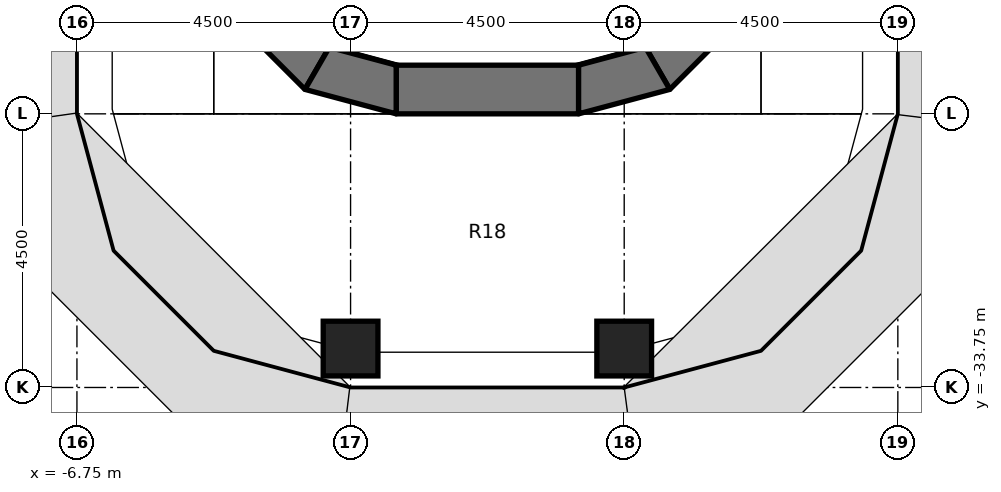
"""IFC4 building model, lengths in metres.
Left out: names, types, materials, properties, quantities, classifications, styles, units other than length and angle.
Written with IfcOpenShell. Run it as: python <this file> out.ifc"""

import sys

from ifc_helpers import new_model, si_unit, direction, frame, frame_2d, origin, origin_2d, place, context, subcontext, project, spatial, polyline, rectangle, outline, extrude, element, save


model = new_model("IFC4")
c1 = context("Model", 3, precision=1e-05, world=origin(), true_north=direction((0.0, 1.0)))
c2 = subcontext(c1, "Body", "Model", "MODEL_VIEW")
j1 = project(units=[si_unit("LENGTHUNIT", "METRE"), si_unit("PLANEANGLEUNIT", "RADIAN")], contexts=[c1])
p1 = place(None, origin())
s1 = spatial("IfcSite", under=j1, at=p1, CompositionType="ELEMENT")
p2 = place(p1, origin())
s2 = spatial("IfcBuilding", under=s1, at=p2, CompositionType="ELEMENT")
p3 = place(p2, frame((0.0, 0.0, 94.2)))
s3 = spatial("IfcBuildingStorey", under=s2, at=p3, CompositionType="ELEMENT", Elevation=94.2)
for number, where, z_axis, x_axis in (
    (1, (-2.25, -33.11, 0.0), (0.0, 0.0, 1.0), (1.0, 0.0, 0.0)),
    (2, (2.25, -33.11, 0.0), (0.0, 0.0, 1.0), (1.0, 0.0, 0.0)),
):
    element("IfcColumn", number, at=place(p3, frame(where, z_axis=z_axis, x_axis=x_axis)), inside=s3, PredefinedType="COLUMN", context=c2, shape_type="SweptSolid", body=[
        extrude(rectangle(XDim=0.9, YDim=0.9, at=origin_2d()), origin(), (0.0, 0.0, 1.0), 3.65),
    ])
p4 = place(p3, frame((-1.5, -28.85, 0.0), z_axis=(0.0, 0.0, 1.0), x_axis=(1.0, 0.0, 0.0)))
e3 = element("IfcWall", 3, at=p4, inside=s3, PredefinedType="SHEAR", context=c2, shape_type="SweptSolid", body=[
    extrude(rectangle(XDim=3.0, YDim=0.8, at=frame_2d((1.5, 0.0))), origin(), (0.0, 0.0, 1.0), 3.8),
])
p5 = place(p3, origin())
e4 = element("IfcWall", 4, at=p5, inside=s3, PredefinedType="SHEAR", context=c2, shape_type="SweptSolid", body=[
    extrude(outline(polyline([(-4.098, -27.75), (-3.0, -28.848), (-2.6, -28.155), (-3.405, -27.35), (-4.098, -27.75)])), origin(), (0.0, 0.0, 1.0), 3.8),
])
p6 = place(p3, origin())
e5 = element("IfcWall", 5, at=p6, inside=s3, PredefinedType="SHEAR", context=c2, shape_type="SweptSolid", body=[
    extrude(outline(polyline([(-3.0, -28.848), (-1.5, -29.25), (-1.5, -28.45), (-2.6, -28.155), (-3.0, -28.848)])), origin(), (0.0, 0.0, 1.0), 3.8),
])
p7 = place(p3, origin())
e6 = element("IfcWall", 6, at=p7, inside=s3, PredefinedType="SHEAR", context=c2, shape_type="SweptSolid", body=[
    extrude(outline(polyline([(4.098, -27.75), (3.0, -28.848), (2.6, -28.155), (3.405, -27.35), (4.098, -27.75)])), origin(), (0.0, 0.0, 1.0), 3.8),
])
p8 = place(p3, origin())
e7 = element("IfcWall", 7, at=p8, inside=s3, PredefinedType="SHEAR", context=c2, shape_type="SweptSolid", body=[
    extrude(outline(polyline([(3.0, -28.848), (1.5, -29.25), (1.5, -28.45), (2.6, -28.155), (3.0, -28.848)])), origin(), (0.0, 0.0, 1.0), 3.8),
])
save(model, sys.argv[1])
